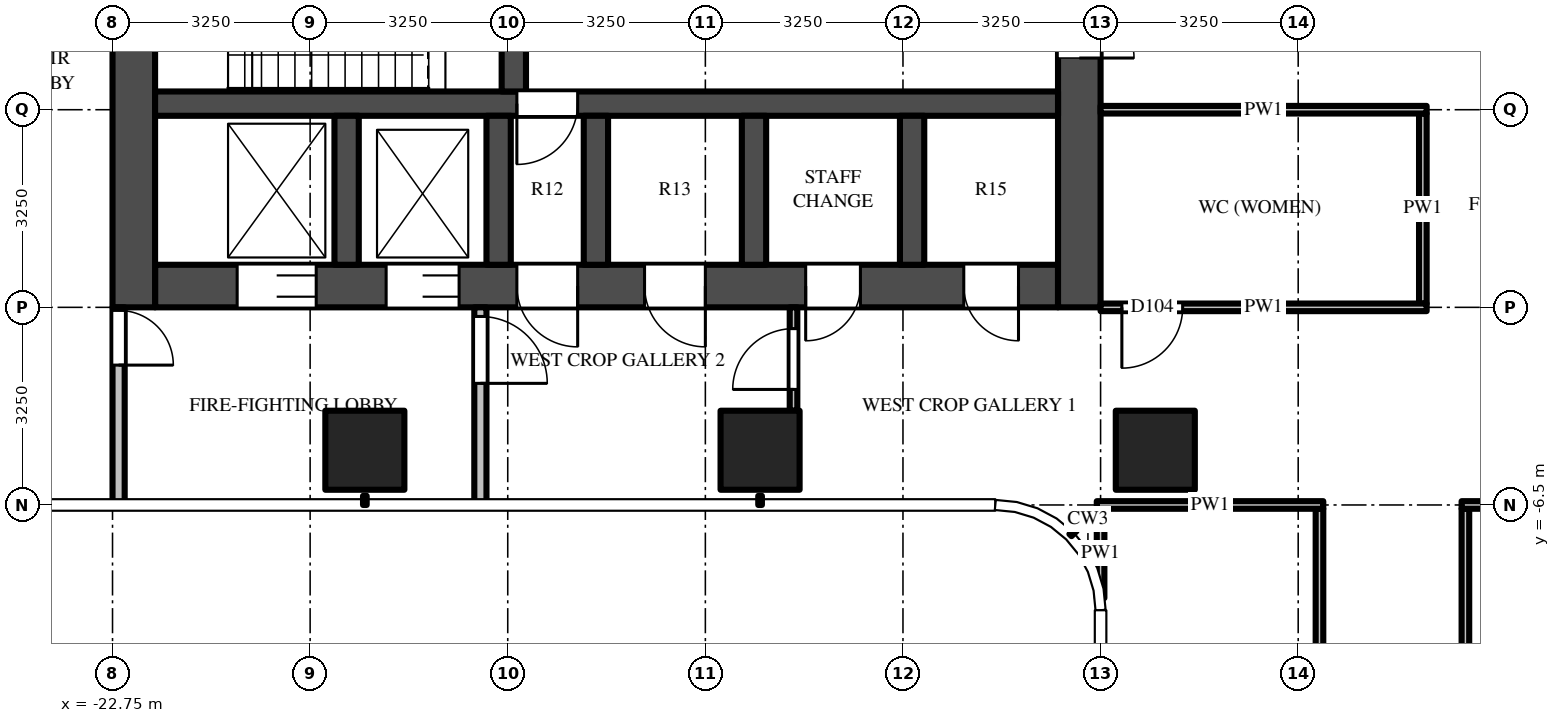
"""IFC4 building model, lengths in metres.
Left out: names, types, materials, properties, quantities, classifications, styles, units other than length and angle.
Written with IfcOpenShell. Run it as: python <this file> out.ifc"""

import sys

from ifc_helpers import new_model, si_unit, direction, frame, frame_2d, origin, origin_2d, place, context, subcontext, project, spatial, rectangle, extrude, source, transform, mapped, element, fill, save


model = new_model("IFC4")
c1 = context("Model", 3, precision=1e-05, world=origin(), true_north=direction((0.0, 1.0)))
c2 = subcontext(c1, "Body", "Model", "MODEL_VIEW")
j1 = project(units=[si_unit("LENGTHUNIT", "METRE"), si_unit("PLANEANGLEUNIT", "RADIAN")], contexts=[c1])
p1 = place(None, origin())
s1 = spatial("IfcSite", under=j1, at=p1, CompositionType="ELEMENT")
p2 = place(p1, origin())
s2 = spatial("IfcBuilding", under=s1, at=p2, CompositionType="ELEMENT")
p3 = place(p2, frame((0.0, 0.0, 102.0)))
s3 = spatial("IfcBuildingStorey", under=s2, at=p3, CompositionType="ELEMENT", Elevation=102.0)
m1 = source(origin(), c2, "Body", "SweptSolid", [
    extrude(rectangle(XDim=1.3, YDim=1.3, at=origin_2d()), origin(), (0.0, 0.0, 1.0), 4.5),
])
for number, where, z_axis, x_axis in (
    (1, (-5.6, -5.6, 0.0), (0.0, 0.0, 1.0), (1.0, 0.0, 0.0)),
    (2, (-12.1, -5.6, 0.0), (0.0, 0.0, 1.0), (1.0, 0.0, 0.0)),
    (3, (-18.6, -5.6, 0.0), (0.0, 0.0, 1.0), (1.0, 0.0, 0.0)),
):
    element("IfcColumn", number, at=place(p3, frame(where, z_axis=z_axis, x_axis=x_axis)), inside=s3, PredefinedType="COLUMN", context=c2, shape_type="MappedRepresentation", body=[
        mapped(m1, transform((0.0, 0.0, 0.0))),
    ])
m2 = source(origin(), c2, "Body", "SweptSolid", [
    extrude(rectangle(XDim=14.85, YDim=0.7, at=frame_2d((7.425, 0.0))), origin(), (0.0, 0.0, 1.0), 4.25),
])
p4 = place(p3, frame((-7.2, -2.9, 0.0), z_axis=(0.0, 0.0, 1.0), x_axis=(-1.0, 0.0, 0.0)))
e4 = element("IfcWall", 4, at=p4, inside=s3, PredefinedType="SHEAR", context=c2, shape_type="MappedRepresentation", body=[
    mapped(m2, transform((0.0, 0.0, 0.0))),
])
m3 = source(origin(), c2, "Body", "SweptSolid", [
    extrude(rectangle(XDim=1.3, YDim=2.1, at=frame_2d((0.65, 1.05))), frame((0.0, 0.36, 0.0), z_axis=(0.0, -1.0, 0.0), x_axis=(1.0, 0.0, 0.0)), (0.0, 0.0, 1.0), 0.72),
])
p5 = place(p4, frame((12.2, 0.0, 0.0)))
e5 = element("IfcOpeningElement", 5, at=p5, cuts=e4, PredefinedType="OPENING", context=c2, shape_type="MappedRepresentation", body=[
    mapped(m3, transform((0.0, 0.0, 0.0))),
])
m4 = source(origin(), c2, "Body", "SweptSolid", [
    extrude(rectangle(XDim=1.2, YDim=2.1, at=frame_2d((0.6, 1.05))), frame((0.0, 0.36, 0.0), z_axis=(0.0, -1.0, 0.0), x_axis=(1.0, 0.0, 0.0)), (0.0, 0.0, 1.0), 0.72),
])
p6 = place(p4, frame((9.85, 0.0, 0.0)))
e6 = element("IfcOpeningElement", 6, at=p6, cuts=e4, PredefinedType="OPENING", context=c2, shape_type="MappedRepresentation", body=[
    mapped(m4, transform((0.0, 0.0, 0.0))),
])
m5 = source(origin(), c2, "Body", "SweptSolid", [
    extrude(rectangle(XDim=1.0, YDim=2.1, at=frame_2d((0.5, 1.05))), frame((0.0, 0.36, 0.0), z_axis=(0.0, -1.0, 0.0), x_axis=(1.0, 0.0, 0.0)), (0.0, 0.0, 1.0), 0.72),
])
p7 = place(p4, frame((7.9, 0.0, 0.0)))
e7 = element("IfcOpeningElement", 7, at=p7, cuts=e4, PredefinedType="OPENING", context=c2, shape_type="MappedRepresentation", body=[
    mapped(m5, transform((0.0, 0.0, 0.0))),
])
m6 = source(origin(), c2, "Body", "SweptSolid", [
    extrude(rectangle(XDim=0.9, YDim=2.1, at=frame_2d((0.45, 1.05))), frame((0.0, 0.36, 0.0), z_axis=(0.0, -1.0, 0.0), x_axis=(1.0, 0.0, 0.0)), (0.0, 0.0, 1.0), 0.72),
])
p8 = place(p4, frame((0.65, 0.0, 0.0)))
e8 = element("IfcOpeningElement", 8, at=p8, cuts=e4, PredefinedType="OPENING", context=c2, shape_type="MappedRepresentation", body=[
    mapped(m6, transform((0.0, 0.0, 0.0))),
])
p9 = place(p4, frame((3.25, 0.0, 0.0)))
e9 = element("IfcOpeningElement", 9, at=p9, cuts=e4, PredefinedType="OPENING", context=c2, shape_type="MappedRepresentation", body=[
    mapped(m6, transform((0.0, 0.0, 0.0))),
])
p10 = place(p4, frame((5.8, 0.0, 0.0)))
e10 = element("IfcOpeningElement", 10, at=p10, cuts=e4, PredefinedType="OPENING", context=c2, shape_type="MappedRepresentation", body=[
    mapped(m5, transform((0.0, 0.0, 0.0))),
])
m7 = source(origin(), c2, "Body", "SweptSolid", [
    extrude(rectangle(XDim=9.05, YDim=0.7, at=frame_2d((4.525, 0.0))), origin(), (0.0, 0.0, 1.0), 4.25),
])
p11 = place(p3, frame((-6.85, 5.8, 0.0), z_axis=(0.0, 0.0, 1.0), x_axis=(0.0, -1.0, 0.0)))
e11 = element("IfcWall", 11, at=p11, inside=s3, PredefinedType="SHEAR", context=c2, shape_type="MappedRepresentation", body=[
    mapped(m7, transform((0.0, 0.0, 0.0))),
])
m8 = source(origin(), c2, "Body", "SweptSolid", [
    extrude(rectangle(XDim=1.8, YDim=2.1, at=frame_2d((0.9, 1.05))), frame((0.0, 0.36, 0.0), z_axis=(0.0, -1.0, 0.0), x_axis=(1.0, 0.0, 0.0)), (0.0, 0.0, 1.0), 0.72),
])
p12 = place(p11, frame((3.15, 0.0, 0.0)))
e12 = element("IfcOpeningElement", 12, at=p12, cuts=e11, PredefinedType="OPENING", context=c2, shape_type="MappedRepresentation", body=[
    mapped(m8, transform((0.0, 0.0, 0.0))),
])
p13 = place(p3, frame((-22.4, 5.8, 0.0), z_axis=(0.0, 0.0, 1.0), x_axis=(0.0, -1.0, 0.0)))
e13 = element("IfcWall", 13, at=p13, inside=s3, PredefinedType="SHEAR", context=c2, shape_type="MappedRepresentation", body=[
    mapped(m7, transform((0.0, 0.0, 0.0))),
])
m9 = source(origin(), c2, "Body", "SweptSolid", [
    extrude(rectangle(XDim=14.85, YDim=0.4, at=frame_2d((7.425, 0.0))), origin(), (0.0, 0.0, 1.0), 4.25),
])
p14 = place(p3, frame((-7.2, 0.1, 0.0), z_axis=(0.0, 0.0, 1.0), x_axis=(-1.0, 0.0, 0.0)))
e14 = element("IfcWall", 14, at=p14, inside=s3, PredefinedType="SHEAR", context=c2, shape_type="MappedRepresentation", body=[
    mapped(m9, transform((0.0, 0.0, 0.0))),
])
m10 = source(origin(), c2, "Body", "SweptSolid", [
    extrude(rectangle(XDim=1.0, YDim=2.1, at=frame_2d((0.5, 1.05))), frame((0.0, 0.21, 0.0), z_axis=(0.0, -1.0, 0.0), x_axis=(1.0, 0.0, 0.0)), (0.0, 0.0, 1.0), 0.42),
])
p15 = place(p14, frame((7.9, 0.0, 0.0)))
e15 = element("IfcOpeningElement", 15, at=p15, cuts=e14, PredefinedType="OPENING", context=c2, shape_type="MappedRepresentation", body=[
    mapped(m10, transform((0.0, 0.0, 0.0))),
])
m11 = source(origin(), c2, "Body", "SweptSolid", [
    extrude(rectangle(XDim=5.5, YDim=0.4, at=frame_2d((2.75, 0.0))), origin(), (0.0, 0.0, 1.0), 4.25),
])
p16 = place(p3, frame((-16.15, 5.8, 0.0), z_axis=(0.0, 0.0, 1.0), x_axis=(0.0, -1.0, 0.0)))
e16 = element("IfcWall", 16, at=p16, inside=s3, PredefinedType="SHEAR", context=c2, shape_type="MappedRepresentation", body=[
    mapped(m11, transform((0.0, 0.0, 0.0))),
])
m12 = source(origin(), c2, "Body", "SweptSolid", [
    extrude(rectangle(XDim=1.1, YDim=2.1, at=frame_2d((0.55, 1.05))), frame((0.0, 0.21, 0.0), z_axis=(0.0, -1.0, 0.0), x_axis=(1.0, 0.0, 0.0)), (0.0, 0.0, 1.0), 0.42),
])
p17 = place(p16, frame((0.725, 0.0, 0.0)))
e17 = element("IfcOpeningElement", 17, at=p17, cuts=e16, PredefinedType="OPENING", context=c2, shape_type="MappedRepresentation", body=[
    mapped(m12, transform((0.0, 0.0, 0.0))),
])
p18 = place(p16, frame((3.675, 0.0, 0.0)))
e18 = element("IfcOpeningElement", 18, at=p18, cuts=e16, PredefinedType="OPENING", context=c2, shape_type="MappedRepresentation", body=[
    mapped(m12, transform((0.0, 0.0, 0.0))),
])
m13 = source(origin(), c2, "Body", "SweptSolid", [
    extrude(rectangle(XDim=2.45, YDim=0.4, at=frame_2d((1.225, 0.0))), origin(), (0.0, 0.0, 1.0), 4.25),
])
for number, where, z_axis, x_axis in (
    (19, (-9.6, -0.1, 0.0), (0.0, 0.0, 1.0), (0.0, -1.0, 0.0)),
    (20, (-12.2, -0.1, 0.0), (0.0, 0.0, 1.0), (0.0, -1.0, 0.0)),
    (21, (-14.8, -0.1, 0.0), (0.0, 0.0, 1.0), (0.0, -1.0, 0.0)),
    (22, (-16.4, -0.1, 0.0), (0.0, 0.0, 1.0), (0.0, -1.0, 0.0)),
    (23, (-18.9, -0.1, 0.0), (0.0, 0.0, 1.0), (0.0, -1.0, 0.0)),
):
    element("IfcWall", number, at=place(p3, frame(where, z_axis=z_axis, x_axis=x_axis)), inside=s3, PredefinedType="SHEAR", context=c2, shape_type="MappedRepresentation", body=[
        mapped(m13, transform((0.0, 0.0, 0.0))),
    ])
m14 = source(origin(), c2, "Body", "SweptSolid", [
    extrude(rectangle(XDim=3.25, YDim=0.2, at=frame_2d((1.625, 0.0))), origin(), (0.0, 0.0, 1.0), 4.25),
])
p19 = place(p3, frame((-16.7, -3.25, 0.0), z_axis=(0.0, 0.0, 1.0), x_axis=(0.0, -1.0, 0.0)))
e24 = element("IfcWall", 24, at=p19, inside=s3, PredefinedType="PARTITIONING", context=c2, shape_type="MappedRepresentation", body=[
    mapped(m14, transform((0.0, 0.0, 0.0))),
])
m15 = source(origin(), c2, "Body", "SweptSolid", [
    extrude(rectangle(XDim=1.1, YDim=2.1, at=frame_2d((0.55, 1.05))), frame((0.0, 0.11, 0.0), z_axis=(0.0, -1.0, 0.0), x_axis=(1.0, 0.0, 0.0)), (0.0, 0.0, 1.0), 0.22),
])
p20 = place(p19, frame((0.15, 0.0, 0.0)))
e25 = element("IfcOpeningElement", 25, at=p20, cuts=e24, PredefinedType="OPENING", context=c2, shape_type="MappedRepresentation", body=[
    mapped(m15, transform((0.0, 0.0, 0.0))),
])
p21 = place(p3, frame((-22.65, -3.25, 0.0), z_axis=(0.0, 0.0, 1.0), x_axis=(0.0, -1.0, 0.0)))
e26 = element("IfcWall", 26, at=p21, inside=s3, PredefinedType="PARTITIONING", context=c2, shape_type="MappedRepresentation", body=[
    mapped(m14, transform((0.0, 0.0, 0.0))),
])
m16 = source(origin(), c2, "Body", "SweptSolid", [
    extrude(rectangle(XDim=0.9, YDim=2.1, at=frame_2d((0.45, 1.05))), frame((0.0, 0.11, 0.0), z_axis=(0.0, -1.0, 0.0), x_axis=(1.0, 0.0, 0.0)), (0.0, 0.0, 1.0), 0.22),
])
p22 = place(p21, frame((0.05, 0.0, 0.0)))
e27 = element("IfcOpeningElement", 27, at=p22, cuts=e26, PredefinedType="OPENING", context=c2, shape_type="MappedRepresentation", body=[
    mapped(m16, transform((0.0, 0.0, 0.0))),
])
m17 = source(origin(), c2, "Body", "SweptSolid", [
    extrude(rectangle(XDim=1.7, YDim=0.125, at=frame_2d((0.85, 0.0))), origin(), (0.0, 0.0, 1.0), 4.25),
])
p23 = place(p3, frame((-11.55, -4.95, 0.0), z_axis=(0.0, 0.0, 1.0), x_axis=(0.0, 1.0, 0.0)))
e28 = element("IfcWall", 28, at=p23, inside=s3, PredefinedType="PARTITIONING", context=c2, shape_type="MappedRepresentation", body=[
    mapped(m17, transform((0.0, 0.0, 0.0))),
])
m18 = source(origin(), c2, "Body", "SweptSolid", [
    extrude(rectangle(XDim=1.0, YDim=2.1, at=frame_2d((0.5, 1.05))), frame((0.0, 0.073, 0.0), z_axis=(0.0, -1.0, 0.0), x_axis=(1.0, 0.0, 0.0)), (0.0, 0.0, 1.0), 0.145),
])
p24 = place(p23, frame((0.35, 0.0, 0.0)))
e29 = element("IfcOpeningElement", 29, at=p24, cuts=e28, PredefinedType="OPENING", context=c2, shape_type="MappedRepresentation", body=[
    mapped(m18, transform((0.0, 0.0, 0.0))),
])
m19 = source(origin(), c2, "Body", "SweptSolid", [
    extrude(rectangle(XDim=1.469, YDim=0.125, at=frame_2d((0.734, 0.0))), origin(), (0.0, 0.0, 1.0), 4.25),
])
p25 = place(p3, frame((-6.5, -6.562, 0.0), z_axis=(0.0, 0.0, 1.0), x_axis=(0.0, -1.0, 0.0)))
e30 = element("IfcWall", 30, at=p25, inside=s3, PredefinedType="PARTITIONING", context=c2, shape_type="MappedRepresentation", body=[
    mapped(m19, transform((0.0, 0.0, 0.0))),
])
m20 = source(origin(), c2, "Body", "SweptSolid", [
    extrude(rectangle(XDim=5.538, YDim=0.125, at=frame_2d((2.769, 0.0))), origin(), (0.0, 0.0, 1.0), 3.468),
])
p26 = place(p3, frame((-2.9, -12.1, 0.0), z_axis=(0.0, 0.0, 1.0), x_axis=(0.0, 1.0, 0.0)))
e31 = element("IfcWall", 31, at=p26, inside=s3, PredefinedType="PARTITIONING", context=c2, shape_type="MappedRepresentation", body=[
    mapped(m20, transform((0.0, 0.0, 0.0))),
])
p27 = place(p26, frame((0.35, 0.0, 0.0)))
e32 = element("IfcOpeningElement", 32, at=p27, cuts=e31, PredefinedType="OPENING", context=c2, shape_type="MappedRepresentation", body=[
    mapped(m18, transform((0.0, 0.0, 0.0))),
])
m21 = source(origin(), c2, "Body", "SweptSolid", [
    extrude(rectangle(XDim=3.125, YDim=0.125, at=frame_2d((1.562, 0.0))), origin(), (0.0, 0.0, 1.0), 3.546),
])
p28 = place(p3, frame((-1.2, -0.062, 0.0), z_axis=(0.0, 0.0, 1.0), x_axis=(0.0, -1.0, 0.0)))
e33 = element("IfcWall", 33, at=p28, inside=s3, PredefinedType="PARTITIONING", context=c2, shape_type="MappedRepresentation", body=[
    mapped(m21, transform((0.0, 0.0, 0.0))),
])
m22 = source(origin(), c2, "Body", "SweptSolid", [
    extrude(rectangle(XDim=5.475, YDim=0.125, at=frame_2d((2.738, 0.0))), origin(), (0.0, 0.0, 1.0), 3.468),
])
p29 = place(p3, frame((-0.5, -12.038, 0.0), z_axis=(0.0, 0.0, 1.0), x_axis=(0.0, 1.0, 0.0)))
e34 = element("IfcWall", 34, at=p29, inside=s3, PredefinedType="PARTITIONING", context=c2, shape_type="MappedRepresentation", body=[
    mapped(m22, transform((0.0, 0.0, 0.0))),
])
p30 = place(p29, frame((0.288, 0.0, 0.0)))
e35 = element("IfcOpeningElement", 35, at=p30, cuts=e34, PredefinedType="OPENING", context=c2, shape_type="MappedRepresentation", body=[
    mapped(m18, transform((0.0, 0.0, 0.0))),
])
m23 = source(origin(), c2, "Body", "SweptSolid", [
    extrude(rectangle(XDim=3.725, YDim=0.125, at=frame_2d((1.863, 0.0))), origin(), (0.0, 0.0, 1.0), 3.33),
])
p31 = place(p3, frame((-2.837, -6.5, 0.0), z_axis=(0.0, 0.0, 1.0), x_axis=(-1.0, 0.0, 0.0)))
e36 = element("IfcWall", 36, at=p31, inside=s3, PredefinedType="PARTITIONING", context=c2, shape_type="MappedRepresentation", body=[
    mapped(m23, transform((0.0, 0.0, 0.0))),
])
m24 = source(origin(), c2, "Body", "SweptSolid", [
    extrude(rectangle(XDim=1.825, YDim=0.125, at=frame_2d((0.913, 0.0))), origin(), (0.0, 0.0, 1.0), 4.25),
])
p32 = place(p3, frame((1.262, -6.5, 0.0), z_axis=(0.0, 0.0, 1.0), x_axis=(-1.0, 0.0, 0.0)))
e37 = element("IfcWall", 37, at=p32, inside=s3, PredefinedType="PARTITIONING", context=c2, shape_type="MappedRepresentation", body=[
    mapped(m24, transform((0.0, 0.0, 0.0))),
])
m25 = source(origin(), c2, "Body", "SweptSolid", [
    extrude(rectangle(XDim=5.363, YDim=0.125, at=frame_2d((2.681, 0.0))), origin(), (0.0, 0.0, 1.0), 3.468),
])
p33 = place(p3, frame((-1.137, -3.25, 0.0), z_axis=(0.0, 0.0, 1.0), x_axis=(-1.0, 0.0, 0.0)))
e38 = element("IfcWall", 38, at=p33, inside=s3, PredefinedType="PARTITIONING", context=c2, shape_type="MappedRepresentation", body=[
    mapped(m25, transform((0.0, 0.0, 0.0))),
])
p34 = place(p33, frame((4.012, 0.0, 0.0)))
e39 = element("IfcOpeningElement", 39, at=p34, cuts=e38, PredefinedType="OPENING", context=c2, shape_type="MappedRepresentation", body=[
    mapped(m18, transform((0.0, 0.0, 0.0))),
])
p35 = place(p3, frame((-1.137, 0.0, 0.0), z_axis=(0.0, 0.0, 1.0), x_axis=(-1.0, 0.0, 0.0)))
e40 = element("IfcWall", 40, at=p35, inside=s3, PredefinedType="PARTITIONING", context=c2, shape_type="MappedRepresentation", body=[
    mapped(m25, transform((0.0, 0.0, 0.0))),
])
m26 = source(origin(), c2, "Body", "SweptSolid", [
    extrude(rectangle(XDim=1.3, YDim=2.1, at=frame_2d((0.65, 1.05))), frame((0.0, -0.275, 0.0), z_axis=(0.0, -1.0, 0.0), x_axis=(1.0, 0.0, 0.0)), (0.0, 0.0, 1.0), 0.05),
])
p36 = place(p5, origin())
e41 = element("IfcDoor", 41, at=p36, inside=s3, OperationType="DOUBLE_DOOR_SLIDING", PredefinedType="DOOR", context=c2, shape_type="MappedRepresentation", body=[
    mapped(m26, transform((0.0, 0.0, 0.0))),
])
fill(e5, e41)
m27 = source(origin(), c2, "Body", "SweptSolid", [
    extrude(rectangle(XDim=1.2, YDim=2.1, at=frame_2d((0.6, 1.05))), frame((0.0, -0.275, 0.0), z_axis=(0.0, -1.0, 0.0), x_axis=(1.0, 0.0, 0.0)), (0.0, 0.0, 1.0), 0.05),
])
p37 = place(p6, origin())
e42 = element("IfcDoor", 42, at=p37, inside=s3, OperationType="DOUBLE_DOOR_SLIDING", PredefinedType="DOOR", context=c2, shape_type="MappedRepresentation", body=[
    mapped(m27, transform((0.0, 0.0, 0.0))),
])
fill(e6, e42)
m28 = source(origin(), c2, "Body", "SweptSolid", [
    extrude(rectangle(XDim=1.8, YDim=2.1, at=frame_2d((0.9, 1.05))), frame((0.0, -0.275, 0.0), z_axis=(0.0, -1.0, 0.0), x_axis=(1.0, 0.0, 0.0)), (0.0, 0.0, 1.0), 0.05),
])
p38 = place(p12, origin())
e43 = element("IfcDoor", 43, at=p38, inside=s3, OperationType="DOUBLE_DOOR_SINGLE_SWING", PredefinedType="DOOR", context=c2, shape_type="MappedRepresentation", body=[
    mapped(m28, transform((0.0, 0.0, 0.0))),
])
fill(e12, e43)
m29 = source(origin(), c2, "Body", "SweptSolid", [
    extrude(rectangle(XDim=1.0, YDim=2.1, at=frame_2d((0.5, 1.05))), frame((0.0, 0.025, 0.0), z_axis=(0.0, -1.0, 0.0), x_axis=(1.0, 0.0, 0.0)), (0.0, 0.0, 1.0), 0.05),
])
p39 = place(p15, origin())
e44 = element("IfcDoor", 44, at=p39, inside=s3, OperationType="SINGLE_SWING_RIGHT", PredefinedType="DOOR", context=c2, shape_type="MappedRepresentation", body=[
    mapped(m29, transform((0.0, 0.0, 0.0))),
])
fill(e15, e44)
m30 = source(origin(), c2, "Body", "SweptSolid", [
    extrude(rectangle(XDim=1.0, YDim=2.1, at=frame_2d((0.5, 1.05))), frame((0.0, -0.275, 0.0), z_axis=(0.0, -1.0, 0.0), x_axis=(1.0, 0.0, 0.0)), (0.0, 0.0, 1.0), 0.05),
])
p40 = place(p7, origin())
e45 = element("IfcDoor", 45, at=p40, inside=s3, OperationType="SINGLE_SWING_LEFT", PredefinedType="DOOR", context=c2, shape_type="MappedRepresentation", body=[
    mapped(m30, transform((0.0, 0.0, 0.0))),
])
fill(e7, e45)
m31 = source(origin(), c2, "Body", "SweptSolid", [
    extrude(rectangle(XDim=1.1, YDim=2.1, at=frame_2d((0.55, 1.05))), frame((0.0, 0.025, 0.0), z_axis=(0.0, -1.0, 0.0), x_axis=(1.0, 0.0, 0.0)), (0.0, 0.0, 1.0), 0.05),
])
p41 = place(p20, origin())
e46 = element("IfcDoor", 46, at=p41, inside=s3, OperationType="SINGLE_SWING_RIGHT", PredefinedType="DOOR", context=c2, shape_type="MappedRepresentation", body=[
    mapped(m31, transform((0.0, 0.0, 0.0))),
])
fill(e25, e46)
m32 = source(origin(), c2, "Body", "SweptSolid", [
    extrude(rectangle(XDim=0.9, YDim=2.1, at=frame_2d((0.45, 1.05))), frame((0.0, 0.025, 0.0), z_axis=(0.0, -1.0, 0.0), x_axis=(1.0, 0.0, 0.0)), (0.0, 0.0, 1.0), 0.05),
])
p42 = place(p22, origin())
e47 = element("IfcDoor", 47, at=p42, inside=s3, OperationType="SINGLE_SWING_RIGHT", PredefinedType="DOOR", context=c2, shape_type="MappedRepresentation", body=[
    mapped(m32, transform((0.0, 0.0, 0.0))),
])
fill(e27, e47)
m33 = source(origin(), c2, "Body", "SweptSolid", [
    extrude(rectangle(XDim=0.9, YDim=2.1, at=frame_2d((0.45, 1.05))), frame((0.0, -0.275, 0.0), z_axis=(0.0, -1.0, 0.0), x_axis=(1.0, 0.0, 0.0)), (0.0, 0.0, 1.0), 0.05),
])
p43 = place(p8, origin())
e48 = element("IfcDoor", 48, at=p43, inside=s3, OperationType="SINGLE_SWING_LEFT", PredefinedType="DOOR", context=c2, shape_type="MappedRepresentation", body=[
    mapped(m33, transform((0.0, 0.0, 0.0))),
])
fill(e8, e48)
p44 = place(p9, origin())
e49 = element("IfcDoor", 49, at=p44, inside=s3, OperationType="SINGLE_SWING_RIGHT", PredefinedType="DOOR", context=c2, shape_type="MappedRepresentation", body=[
    mapped(m33, transform((0.0, 0.0, 0.0))),
])
fill(e9, e49)
p45 = place(p10, origin())
e50 = element("IfcDoor", 50, at=p45, inside=s3, OperationType="SINGLE_SWING_LEFT", PredefinedType="DOOR", context=c2, shape_type="MappedRepresentation", body=[
    mapped(m30, transform((0.0, 0.0, 0.0))),
])
fill(e10, e50)
p46 = place(p24, origin())
e51 = element("IfcDoor", 51, at=p46, inside=s3, OperationType="SINGLE_SWING_LEFT", PredefinedType="DOOR", context=c2, shape_type="MappedRepresentation", body=[
    mapped(m29, transform((0.0, 0.0, 0.0))),
])
fill(e29, e51)
p47 = place(p34, origin())
e52 = element("IfcDoor", 52, at=p47, inside=s3, OperationType="SINGLE_SWING_RIGHT", PredefinedType="DOOR", context=c2, shape_type="MappedRepresentation", body=[
    mapped(m29, transform((0.0, 0.0, 0.0))),
])
fill(e39, e52)
save(model, sys.argv[1])
